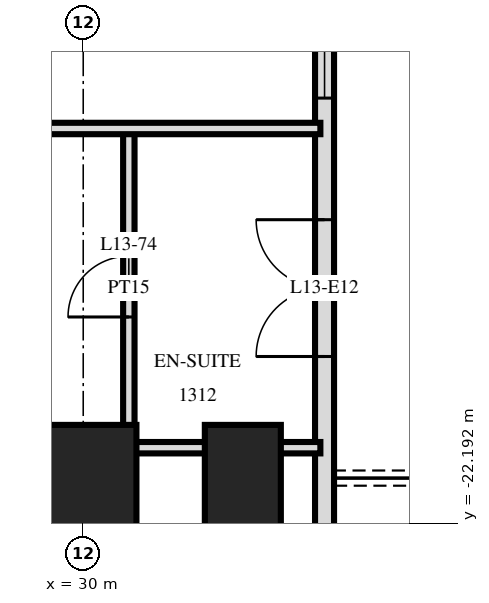
"""IFC4 building model, lengths in metres.
Left out: names, types, materials, properties, quantities, classifications, styles, units other than length and angle.
Written with IfcOpenShell. Run it as: python <this file> out.ifc"""

import sys

from ifc_helpers import new_model, si_unit, direction, frame, frame_2d, origin, origin_2d, place, context, subcontext, project, spatial, rectangle, extrude, element, fill, save


model = new_model("IFC4")
c1 = context("Model", 3, precision=1e-05, world=origin(), true_north=direction((0.0, 1.0)))
c2 = subcontext(c1, "Body", "Model", "MODEL_VIEW")
j1 = project(units=[si_unit("LENGTHUNIT", "METRE"), si_unit("PLANEANGLEUNIT", "RADIAN")], contexts=[c1])
p1 = place(None, origin())
s1 = spatial("IfcSite", under=j1, at=p1, CompositionType="ELEMENT")
p2 = place(p1, origin())
s2 = spatial("IfcBuilding", under=s1, at=p2, CompositionType="ELEMENT")
p3 = place(p2, frame((0.0, 0.0, 56.4)))
s3 = spatial("IfcBuildingStorey", under=s2, at=p3, CompositionType="ELEMENT", Elevation=56.4)
p4 = place(p3, frame((30.0, -21.6, 0.0), z_axis=(0.0, 0.0, 1.0), x_axis=(1.0, 0.0, 0.0)))
e1 = element("IfcColumn", 1, at=p4, inside=s3, PredefinedType="COLUMN", context=c2, shape_type="SweptSolid", body=[
    extrude(rectangle(XDim=1.4, YDim=1.4, at=origin_2d()), origin(), (0.0, 0.0, 1.0), 3.6),
])
p5 = place(p3, frame((32.1, -21.6, 0.0), z_axis=(0.0, 0.0, 1.0), x_axis=(0.0, 1.0, 0.0)))
e2 = element("IfcColumn", 2, at=p5, inside=s3, PredefinedType="COLUMN", context=c2, shape_type="SweptSolid", body=[
    extrude(rectangle(XDim=1.4, YDim=1.0, at=origin_2d()), origin(), (0.0, 0.0, 1.0), 3.6),
])
p6 = place(p3, frame((33.175, -24.875, 0.0), z_axis=(0.0, 0.0, 1.0), x_axis=(0.0, 1.0, 0.0)))
e3 = element("IfcWall", 3, at=p6, inside=s3, PredefinedType="SOLIDWALL", context=c2, shape_type="SweptSolid", body=[
    extrude(rectangle(XDim=21.551, YDim=0.25, at=frame_2d((10.775, 0.0))), origin(), (0.0, 0.0, 1.0), 3.32),
])
p7 = place(p6, frame((0.575, 0.0, 0.0)))
e4 = element("IfcOpeningElement", 4, at=p7, cuts=e3, PredefinedType="OPENING", context=c2, shape_type="SweptSolid", body=[
    extrude(rectangle(XDim=1.8, YDim=2.4, at=frame_2d((0.9, 1.2))), frame((0.0, 0.135, 0.0), z_axis=(0.0, -1.0, 0.0), x_axis=(1.0, 0.0, 0.0)), (0.0, 0.0, 1.0), 0.27),
])
p8 = place(p6, frame((4.875, 0.0, 0.0)))
e5 = element("IfcOpeningElement", 5, at=p8, cuts=e3, PredefinedType="OPENING", context=c2, shape_type="SweptSolid", body=[
    extrude(rectangle(XDim=1.8, YDim=2.4, at=frame_2d((0.9, 1.2))), frame((0.0, 0.135, 0.0), z_axis=(0.0, -1.0, 0.0), x_axis=(1.0, 0.0, 0.0)), (0.0, 0.0, 1.0), 0.27),
])
p9 = place(p6, frame((8.275, 0.0, 0.3)))
e6 = element("IfcOpeningElement", 6, at=p9, cuts=e3, PredefinedType="OPENING", context=c2, shape_type="SweptSolid", body=[
    extrude(rectangle(XDim=1.2, YDim=2.1, at=frame_2d((0.6, 1.05))), frame((0.0, 0.135, 0.0), z_axis=(0.0, -1.0, 0.0), x_axis=(1.0, 0.0, 0.0)), (0.0, 0.0, 1.0), 0.27),
])
p10 = place(p6, frame((10.175, 0.0, 0.3)))
e7 = element("IfcOpeningElement", 7, at=p10, cuts=e3, PredefinedType="OPENING", context=c2, shape_type="SweptSolid", body=[
    extrude(rectangle(XDim=2.4, YDim=2.1, at=frame_2d((1.2, 1.05))), frame((0.0, 0.135, 0.0), z_axis=(0.0, -1.0, 0.0), x_axis=(1.0, 0.0, 0.0)), (0.0, 0.0, 1.0), 0.27),
])
p11 = place(p6, frame((13.475, 0.0, 0.0)))
e8 = element("IfcOpeningElement", 8, at=p11, cuts=e3, PredefinedType="OPENING", context=c2, shape_type="SweptSolid", body=[
    extrude(rectangle(XDim=1.8, YDim=2.4, at=frame_2d((0.9, 1.2))), frame((0.0, 0.135, 0.0), z_axis=(0.0, -1.0, 0.0), x_axis=(1.0, 0.0, 0.0)), (0.0, 0.0, 1.0), 0.27),
])
p12 = place(p3, frame((30.6, -21.2, 0.0), z_axis=(0.0, 0.0, 1.0), x_axis=(0.0, 1.0, 0.0)))
e9 = element("IfcWall", 9, at=p12, inside=s3, PredefinedType="PARTITIONING", context=c2, shape_type="SweptSolid", body=[
    extrude(rectangle(XDim=4.2, YDim=0.15, at=frame_2d((2.1, 0.0))), origin(), (0.0, 0.0, 1.0), 3.32),
])
p13 = place(p12, frame((1.72, 0.0, 0.0)))
e10 = element("IfcOpeningElement", 10, at=p13, cuts=e9, PredefinedType="OPENING", context=c2, shape_type="SweptSolid", body=[
    extrude(rectangle(XDim=0.8, YDim=2.1, at=frame_2d((0.4, 1.05))), frame((0.0, 0.085, 0.0), z_axis=(0.0, -1.0, 0.0), x_axis=(1.0, 0.0, 0.0)), (0.0, 0.0, 1.0), 0.17),
])
p14 = place(p3, frame((30.6, -21.2, 0.0), z_axis=(0.0, 0.0, 1.0), x_axis=(1.0, 0.0, 0.0)))
e11 = element("IfcWall", 11, at=p14, inside=s3, PredefinedType="PARTITIONING", context=c2, shape_type="SweptSolid", body=[
    extrude(rectangle(XDim=2.52, YDim=0.15, at=frame_2d((1.26, 0.0))), origin(), (0.0, 0.0, 1.0), 3.32),
])
p15 = place(p3, frame((-33.12, -17.0, 0.0), z_axis=(0.0, 0.0, 1.0), x_axis=(1.0, 0.0, 0.0)))
e12 = element("IfcWall", 12, at=p15, inside=s3, PredefinedType="PARTITIONING", context=c2, shape_type="SweptSolid", body=[
    extrude(rectangle(XDim=66.24, YDim=0.15, at=frame_2d((33.12, 0.0))), origin(), (0.0, 0.0, 1.0), 3.32),
])
p16 = place(p15, frame((12.27, 0.0, 0.0)))
e13 = element("IfcOpeningElement", 13, at=p16, cuts=e12, PredefinedType="OPENING", context=c2, shape_type="SweptSolid", body=[
    extrude(rectangle(XDim=1.0, YDim=2.1, at=frame_2d((0.5, 1.05))), frame((0.0, 0.085, 0.0), z_axis=(0.0, -1.0, 0.0), x_axis=(1.0, 0.0, 0.0)), (0.0, 0.0, 1.0), 0.17),
])
p17 = place(p15, frame((16.97, 0.0, 0.0)))
e14 = element("IfcOpeningElement", 14, at=p17, cuts=e12, PredefinedType="OPENING", context=c2, shape_type="SweptSolid", body=[
    extrude(rectangle(XDim=1.0, YDim=2.1, at=frame_2d((0.5, 1.05))), frame((0.0, 0.085, 0.0), z_axis=(0.0, -1.0, 0.0), x_axis=(1.0, 0.0, 0.0)), (0.0, 0.0, 1.0), 0.17),
])
p18 = place(p15, frame((18.27, 0.0, 0.0)))
e15 = element("IfcOpeningElement", 15, at=p18, cuts=e12, PredefinedType="OPENING", context=c2, shape_type="SweptSolid", body=[
    extrude(rectangle(XDim=1.0, YDim=2.1, at=frame_2d((0.5, 1.05))), frame((0.0, 0.085, 0.0), z_axis=(0.0, -1.0, 0.0), x_axis=(1.0, 0.0, 0.0)), (0.0, 0.0, 1.0), 0.17),
])
p19 = place(p15, frame((22.97, 0.0, 0.0)))
e16 = element("IfcOpeningElement", 16, at=p19, cuts=e12, PredefinedType="OPENING", context=c2, shape_type="SweptSolid", body=[
    extrude(rectangle(XDim=1.0, YDim=2.1, at=frame_2d((0.5, 1.05))), frame((0.0, 0.085, 0.0), z_axis=(0.0, -1.0, 0.0), x_axis=(1.0, 0.0, 0.0)), (0.0, 0.0, 1.0), 0.17),
])
p20 = place(p15, frame((24.27, 0.0, 0.0)))
e17 = element("IfcOpeningElement", 17, at=p20, cuts=e12, PredefinedType="OPENING", context=c2, shape_type="SweptSolid", body=[
    extrude(rectangle(XDim=1.0, YDim=2.1, at=frame_2d((0.5, 1.05))), frame((0.0, 0.085, 0.0), z_axis=(0.0, -1.0, 0.0), x_axis=(1.0, 0.0, 0.0)), (0.0, 0.0, 1.0), 0.17),
])
p21 = place(p15, frame((28.97, 0.0, 0.0)))
e18 = element("IfcOpeningElement", 18, at=p21, cuts=e12, PredefinedType="OPENING", context=c2, shape_type="SweptSolid", body=[
    extrude(rectangle(XDim=1.0, YDim=2.1, at=frame_2d((0.5, 1.05))), frame((0.0, 0.085, 0.0), z_axis=(0.0, -1.0, 0.0), x_axis=(1.0, 0.0, 0.0)), (0.0, 0.0, 1.0), 0.17),
])
p22 = place(p15, frame((30.27, 0.0, 0.0)))
e19 = element("IfcOpeningElement", 19, at=p22, cuts=e12, PredefinedType="OPENING", context=c2, shape_type="SweptSolid", body=[
    extrude(rectangle(XDim=1.0, YDim=2.1, at=frame_2d((0.5, 1.05))), frame((0.0, 0.085, 0.0), z_axis=(0.0, -1.0, 0.0), x_axis=(1.0, 0.0, 0.0)), (0.0, 0.0, 1.0), 0.17),
])
p23 = place(p15, frame((33.82, 0.0, 0.0)))
e20 = element("IfcOpeningElement", 20, at=p23, cuts=e12, PredefinedType="OPENING", context=c2, shape_type="SweptSolid", body=[
    extrude(rectangle(XDim=1.0, YDim=2.1, at=frame_2d((0.5, 1.05))), frame((0.0, 0.085, 0.0), z_axis=(0.0, -1.0, 0.0), x_axis=(1.0, 0.0, 0.0)), (0.0, 0.0, 1.0), 0.17),
])
p24 = place(p15, frame((46.27, 0.0, 0.0)))
e21 = element("IfcOpeningElement", 21, at=p24, cuts=e12, PredefinedType="OPENING", context=c2, shape_type="SweptSolid", body=[
    extrude(rectangle(XDim=1.0, YDim=2.1, at=frame_2d((0.5, 1.05))), frame((0.0, 0.085, 0.0), z_axis=(0.0, -1.0, 0.0), x_axis=(1.0, 0.0, 0.0)), (0.0, 0.0, 1.0), 0.17),
])
p25 = place(p15, frame((52.97, 0.0, 0.0)))
e22 = element("IfcOpeningElement", 22, at=p25, cuts=e12, PredefinedType="OPENING", context=c2, shape_type="SweptSolid", body=[
    extrude(rectangle(XDim=1.0, YDim=2.1, at=frame_2d((0.5, 1.05))), frame((0.0, 0.085, 0.0), z_axis=(0.0, -1.0, 0.0), x_axis=(1.0, 0.0, 0.0)), (0.0, 0.0, 1.0), 0.17),
])
p26 = place(p15, frame((6.05, 0.0, 0.0)))
e23 = element("IfcOpeningElement", 23, at=p26, cuts=e12, PredefinedType="OPENING", context=c2, shape_type="SweptSolid", body=[
    extrude(rectangle(XDim=1.0, YDim=2.1, at=frame_2d((0.5, 1.05))), frame((0.0, 0.085, 0.0), z_axis=(0.0, -1.0, 0.0), x_axis=(1.0, 0.0, 0.0)), (0.0, 0.0, 1.0), 0.17),
])
p27 = place(p15, frame((59.15, 0.0, 0.0)))
e24 = element("IfcOpeningElement", 24, at=p27, cuts=e12, PredefinedType="OPENING", context=c2, shape_type="SweptSolid", body=[
    extrude(rectangle(XDim=1.0, YDim=2.1, at=frame_2d((0.5, 1.05))), frame((0.0, 0.085, 0.0), z_axis=(0.0, -1.0, 0.0), x_axis=(1.0, 0.0, 0.0)), (0.0, 0.0, 1.0), 0.17),
])
p28 = place(p8, origin())
e25 = element("IfcDoor", 25, at=p28, inside=s3, OperationType="DOUBLE_DOOR_SINGLE_SWING", PredefinedType="DOOR", context=c2, shape_type="SweptSolid", body=[
    extrude(rectangle(XDim=1.8, YDim=2.4, at=frame_2d((0.9, 1.2))), frame((0.0, 0.025, 0.0), z_axis=(0.0, -1.0, 0.0), x_axis=(1.0, 0.0, 0.0)), (0.0, 0.0, 1.0), 0.05),
])
fill(e5, e25)
p29 = place(p9, origin())
e26 = element("IfcWindow", 26, at=p29, inside=s3, PartitioningType="SINGLE_PANEL", PredefinedType="WINDOW", context=c2, shape_type="SweptSolid", body=[
    extrude(rectangle(XDim=1.2, YDim=2.1, at=frame_2d((0.6, 1.05))), frame((0.0, 0.03, 0.0), z_axis=(0.0, -1.0, 0.0), x_axis=(1.0, 0.0, 0.0)), (0.0, 0.0, 1.0), 0.06),
])
fill(e6, e26)
p30 = place(p13, origin())
e27 = element("IfcDoor", 27, at=p30, inside=s3, OperationType="SINGLE_SWING_RIGHT", PredefinedType="DOOR", context=c2, shape_type="SweptSolid", body=[
    extrude(rectangle(XDim=0.8, YDim=2.1, at=frame_2d((0.4, 1.05))), frame((0.0, 0.025, 0.0), z_axis=(0.0, -1.0, 0.0), x_axis=(1.0, 0.0, 0.0)), (0.0, 0.0, 1.0), 0.05),
])
fill(e10, e27)
save(model, sys.argv[1])
